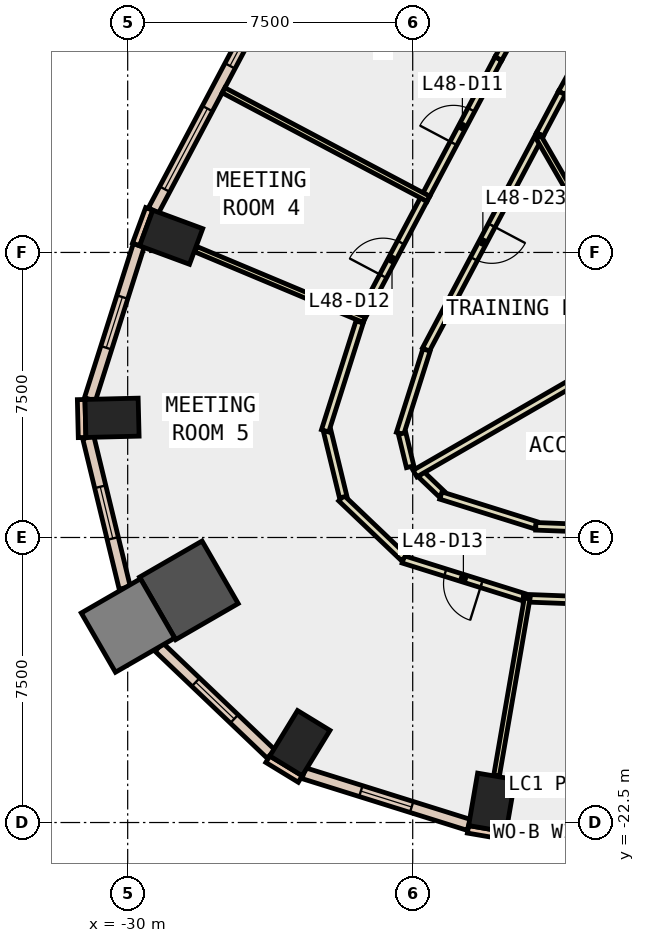
"""IFC4 building model, lengths in metres.
Left out: names, types, materials, properties, quantities, classifications, styles, units other than length and angle.
Written with IfcOpenShell. Run it as: python <this file> out.ifc"""

import sys

from ifc_helpers import new_model, si_unit, direction, frame, frame_2d, origin, origin_2d, place, context, subcontext, project, spatial, rectangle, extrude, element, fill, save


model = new_model("IFC4")
c1 = context("Model", 3, precision=1e-05, world=origin(), true_north=direction((0.0, 1.0)))
c2 = subcontext(c1, "Body", "Model", "MODEL_VIEW")
j1 = project(units=[si_unit("LENGTHUNIT", "METRE"), si_unit("PLANEANGLEUNIT", "RADIAN")], contexts=[c1])
p1 = place(None, origin())
s1 = spatial("IfcSite", under=j1, at=p1, CompositionType="ELEMENT")
p2 = place(p1, origin())
s2 = spatial("IfcBuilding", under=s1, at=p2, CompositionType="ELEMENT")
p3 = place(p2, frame((0.0, 0.0, 215.0)))
s3 = spatial("IfcBuildingStorey", under=s2, at=p3, CompositionType="ELEMENT", Elevation=215.0)
for number, where, z_axis, x_axis in (
    (1, (-20.417, -21.975, -0.4), (0.0, 0.0, 1.0), (-0.986, 0.169, 0.0)),
    (2, (-28.856, -7.1, -0.4), (0.0, 0.0, 1.0), (0.347, 0.938, 0.0)),
    (3, (-30.412, -11.851, -0.4), (0.0, 0.0, 1.0), (-0.025, 1.0, 0.0)),
):
    element("IfcColumn", number, at=place(p3, frame(where, z_axis=z_axis, x_axis=x_axis)), inside=s3, PredefinedType="COLUMN", context=c2, shape_type="SweptSolid", body=[
        extrude(rectangle(XDim=1.0, YDim=1.4, at=origin_2d()), origin(), (0.0, 0.0, 1.0), 4.2),
    ])
p4 = place(p3, frame((-28.39, -16.391, -0.4), z_axis=(0.0, 0.0, 1.0), x_axis=(0.866025403784, 0.5, 0.0)))
e4 = element("IfcColumn", 4, at=p4, inside=s3, PredefinedType="COLUMN", context=c2, shape_type="SweptSolid", body=[
    extrude(rectangle(XDim=1.9, YDim=1.9, at=origin_2d()), origin(), (0.0, 0.0, 1.0), 4.2),
])
p5 = place(p3, frame((-25.469, -20.412, -0.4), z_axis=(0.0, 0.0, 1.0), x_axis=(-0.853423465127, 0.521218178089, 0.0)))
e5 = element("IfcColumn", 5, at=p5, inside=s3, PredefinedType="COLUMN", context=c2, shape_type="SweptSolid", body=[
    extrude(rectangle(XDim=1.0, YDim=1.4, at=origin_2d()), origin(), (0.0, 0.0, 1.0), 4.2),
])
p6 = place(p3, frame((-29.992, -17.316, -0.4), z_axis=(0.0, 0.0, 1.0), x_axis=(0.866025403784, 0.5, 0.0)))
e6 = element("IfcColumn", 6, at=p6, inside=s3, PredefinedType="COLUMN", context=c2, shape_type="SweptSolid", body=[
    extrude(rectangle(XDim=1.8, YDim=1.8, at=origin_2d()), origin(), (0.0, 0.0, 1.0), 4.2),
])
p7 = place(p3, frame((-29.433, -6.354, 0.0), z_axis=(0.0, 0.0, 1.0), x_axis=(-0.346892928577, -0.937904737222, 0.0)))
e7 = element("IfcWall", 7, at=p7, inside=s3, PredefinedType="STANDARD", context=c2, shape_type="SweptSolid", body=[
    extrude(rectangle(XDim=1.0, YDim=0.2, at=frame_2d((0.5, 0.0))), origin(), (0.0, 0.0, 1.0), 3.8),
])
p8 = place(p3, frame((-21.045, -22.679, 0.0), z_axis=(0.0, 0.0, 1.0), x_axis=(0.985631544579, -0.168909615862, 0.0)))
e8 = element("IfcWall", 8, at=p8, inside=s3, PredefinedType="STANDARD", context=c2, shape_type="SweptSolid", body=[
    extrude(rectangle(XDim=1.0, YDim=0.2, at=frame_2d((0.5, 0.0))), origin(), (0.0, 0.0, 1.0), 3.8),
])
p9 = place(p3, frame((-31.224, -11.371, 0.0), z_axis=(0.0, 0.0, 1.0), x_axis=(0.024186470916, -0.999707464524, 0.0)))
e9 = element("IfcWall", 9, at=p9, inside=s3, PredefinedType="STANDARD", context=c2, shape_type="SweptSolid", body=[
    extrude(rectangle(XDim=0.999, YDim=0.2, at=frame_2d((0.5, 0.0))), origin(), (0.0, 0.0, 1.0), 3.8),
])
p10 = place(p3, frame((-26.313, -20.834, 0.0), z_axis=(0.0, 0.0, 1.0), x_axis=(0.853679739553, -0.520798331677, 0.0)))
e10 = element("IfcWall", 10, at=p10, inside=s3, PredefinedType="STANDARD", context=c2, shape_type="SweptSolid", body=[
    extrude(rectangle(XDim=1.0, YDim=0.2, at=frame_2d((0.5, 0.0))), origin(), (0.0, 0.0, 1.0), 3.8),
])
p11 = place(p3, frame((-20.04, -22.732, 0.0), z_axis=(0.0, 0.0, 1.0), x_axis=(0.99926218254, -0.038406907512, 0.0)))
e11 = element("IfcWall", 11, at=p11, inside=s3, PredefinedType="STANDARD", context=c2, shape_type="SweptSolid", body=[
    extrude(rectangle(XDim=5.365, YDim=0.3, at=frame_2d((2.683, 0.0))), origin(), (0.0, 0.0, 1.0), 3.8),
])
p12 = place(p11, frame((0.641, 0.0, 0.9)))
e12 = element("IfcOpeningElement", 12, at=p12, cuts=e11, PredefinedType="OPENING", context=c2, shape_type="SweptSolid", body=[
    extrude(rectangle(XDim=1.4, YDim=2.6, at=frame_2d((0.7, 1.3))), frame((0.0, 0.16, 0.0), z_axis=(0.0, -1.0, 0.0), x_axis=(1.0, 0.0, 0.0)), (0.0, 0.0, 1.0), 0.32),
])
p13 = place(p11, frame((3.324, 0.0, 0.9)))
e13 = element("IfcOpeningElement", 13, at=p13, cuts=e11, PredefinedType="OPENING", context=c2, shape_type="SweptSolid", body=[
    extrude(rectangle(XDim=1.4, YDim=2.6, at=frame_2d((0.7, 1.3))), frame((0.0, 0.16, 0.0), z_axis=(0.0, -1.0, 0.0), x_axis=(1.0, 0.0, 0.0)), (0.0, 0.0, 1.0), 0.32),
])
p14 = place(p3, frame((-25.887, 0.09, 0.0), z_axis=(0.0, 0.0, 1.0), x_axis=(-0.468020680141, -0.8837175131, 0.0)))
e14 = element("IfcWall", 14, at=p14, inside=s3, PredefinedType="STANDARD", context=c2, shape_type="SweptSolid", body=[
    extrude(rectangle(XDim=7.34, YDim=0.3, at=frame_2d((3.67, 0.0))), origin(), (0.0, 0.0, 1.0), 3.8),
])
p15 = place(p14, frame((0.635, 0.0, 0.9)))
e15 = element("IfcOpeningElement", 15, at=p15, cuts=e14, PredefinedType="OPENING", context=c2, shape_type="SweptSolid", body=[
    extrude(rectangle(XDim=2.4, YDim=2.6, at=frame_2d((1.2, 1.3))), frame((0.0, 0.16, 0.0), z_axis=(0.0, -1.0, 0.0), x_axis=(1.0, 0.0, 0.0)), (0.0, 0.0, 1.0), 0.32),
])
p16 = place(p14, frame((4.305, 0.0, 0.9)))
e16 = element("IfcOpeningElement", 16, at=p16, cuts=e14, PredefinedType="OPENING", context=c2, shape_type="SweptSolid", body=[
    extrude(rectangle(XDim=2.4, YDim=2.6, at=frame_2d((1.2, 1.3))), frame((0.0, 0.16, 0.0), z_axis=(0.0, -1.0, 0.0), x_axis=(1.0, 0.0, 0.0)), (0.0, 0.0, 1.0), 0.32),
])
p17 = place(p3, frame((-29.71, -7.316, 0.0), z_axis=(0.0, 0.0, 1.0), x_axis=(-0.302195467572, -0.953245980521, 0.0)))
e17 = element("IfcWall", 17, at=p17, inside=s3, PredefinedType="STANDARD", context=c2, shape_type="SweptSolid", body=[
    extrude(rectangle(XDim=4.249, YDim=0.3, at=frame_2d((2.125, 0.0))), origin(), (0.0, 0.0, 1.0), 3.8),
])
p18 = place(p17, frame((1.424, 0.0, 0.9)))
e18 = element("IfcOpeningElement", 18, at=p18, cuts=e17, PredefinedType="OPENING", context=c2, shape_type="SweptSolid", body=[
    extrude(rectangle(XDim=1.4, YDim=2.6, at=frame_2d((0.7, 1.3))), frame((0.0, 0.16, 0.0), z_axis=(0.0, -1.0, 0.0), x_axis=(1.0, 0.0, 0.0)), (0.0, 0.0, 1.0), 0.32),
])
p19 = place(p3, frame((-31.038, -12.365, 0.0), z_axis=(0.0, 0.0, 1.0), x_axis=(0.235766276378, -0.971809787419, 0.0)))
e19 = element("IfcWall", 19, at=p19, inside=s3, PredefinedType="STANDARD", context=c2, shape_type="SweptSolid", body=[
    extrude(rectangle(XDim=4.077, YDim=0.3, at=frame_2d((2.039, 0.0))), origin(), (0.0, 0.0, 1.0), 3.8),
])
p20 = place(p19, frame((1.338, 0.0, 0.9)))
e20 = element("IfcOpeningElement", 20, at=p20, cuts=e19, PredefinedType="OPENING", context=c2, shape_type="SweptSolid", body=[
    extrude(rectangle(XDim=1.4, YDim=2.6, at=frame_2d((0.7, 1.3))), frame((0.0, 0.16, 0.0), z_axis=(0.0, -1.0, 0.0), x_axis=(1.0, 0.0, 0.0)), (0.0, 0.0, 1.0), 0.32),
])
p21 = place(p3, frame((-29.178, -17.884, 0.0), z_axis=(0.0, 0.0, 1.0), x_axis=(0.723707630873, -0.69010670553, 0.0)))
e21 = element("IfcWall", 21, at=p21, inside=s3, PredefinedType="STANDARD", context=c2, shape_type="SweptSolid", body=[
    extrude(rectangle(XDim=4.076, YDim=0.3, at=frame_2d((2.038, 0.0))), origin(), (0.0, 0.0, 1.0), 3.8),
])
p22 = place(p21, frame((1.338, 0.0, 0.9)))
e22 = element("IfcOpeningElement", 22, at=p22, cuts=e21, PredefinedType="OPENING", context=c2, shape_type="SweptSolid", body=[
    extrude(rectangle(XDim=1.4, YDim=2.6, at=frame_2d((0.7, 1.3))), frame((0.0, 0.16, 0.0), z_axis=(0.0, -1.0, 0.0), x_axis=(1.0, 0.0, 0.0)), (0.0, 0.0, 1.0), 0.32),
])
p23 = place(p3, frame((-25.367, -21.202, 0.0), z_axis=(0.0, 0.0, 1.0), x_axis=(0.954297481837, -0.298858354675, 0.0)))
e23 = element("IfcWall", 23, at=p23, inside=s3, PredefinedType="STANDARD", context=c2, shape_type="SweptSolid", body=[
    extrude(rectangle(XDim=4.551, YDim=0.3, at=frame_2d((2.275, 0.0))), origin(), (0.0, 0.0, 1.0), 3.8),
])
p24 = place(p23, frame((1.575, 0.0, 0.9)))
e24 = element("IfcOpeningElement", 24, at=p24, cuts=e23, PredefinedType="OPENING", context=c2, shape_type="SweptSolid", body=[
    extrude(rectangle(XDim=1.4, YDim=2.6, at=frame_2d((0.7, 1.3))), frame((0.0, 0.16, 0.0), z_axis=(0.0, -1.0, 0.0), x_axis=(1.0, 0.0, 0.0)), (0.0, 0.0, 1.0), 0.32),
])
p25 = place(p3, frame((-14.652, 3.783, 0.0), z_axis=(0.0, 0.0, 1.0), x_axis=(-0.484249955458, -0.874929700398, 0.0)))
e25 = element("IfcWall", 25, at=p25, inside=s3, PredefinedType="PARTITIONING", context=c2, shape_type="SweptSolid", body=[
    extrude(rectangle(XDim=8.099, YDim=0.2, at=frame_2d((4.049, 0.0))), origin(), (0.0, 0.0, 1.0), 3.8),
])
p26 = place(p25, frame((3.55, 0.0, 0.0)))
e26 = element("IfcOpeningElement", 26, at=p26, cuts=e25, PredefinedType="OPENING", context=c2, shape_type="SweptSolid", body=[
    extrude(rectangle(XDim=1.0, YDim=2.1, at=frame_2d((0.5, 1.05))), frame((0.0, 0.11, 0.0), z_axis=(0.0, -1.0, 0.0), x_axis=(1.0, 0.0, 0.0)), (0.0, 0.0, 1.0), 0.22),
])
p27 = place(p3, frame((-18.574, -3.303, 0.0), z_axis=(0.0, 0.0, 1.0), x_axis=(-0.468458328651, -0.883485593724, 0.0)))
e27 = element("IfcWall", 27, at=p27, inside=s3, PredefinedType="PARTITIONING", context=c2, shape_type="SweptSolid", body=[
    extrude(rectangle(XDim=1.238, YDim=0.2, at=frame_2d((0.619, 0.0))), origin(), (0.0, 0.0, 1.0), 3.8),
])
p28 = place(p3, frame((-19.154, -4.397, 0.0), z_axis=(0.0, 0.0, 1.0), x_axis=(-0.468118749105, -0.883665568378, 0.0)))
e28 = element("IfcWall", 28, at=p28, inside=s3, PredefinedType="PARTITIONING", context=c2, shape_type="SweptSolid", body=[
    extrude(rectangle(XDim=6.409, YDim=0.2, at=frame_2d((3.204, 0.0))), origin(), (0.0, 0.0, 1.0), 3.8),
])
p29 = place(p28, frame((2.704, 0.0, 0.0)))
e29 = element("IfcOpeningElement", 29, at=p29, cuts=e28, PredefinedType="OPENING", context=c2, shape_type="SweptSolid", body=[
    extrude(rectangle(XDim=1.0, YDim=2.1, at=frame_2d((0.5, 1.05))), frame((0.0, 0.11, 0.0), z_axis=(0.0, -1.0, 0.0), x_axis=(1.0, 0.0, 0.0)), (0.0, 0.0, 1.0), 0.22),
])
p30 = place(p3, frame((-22.137, -10.067, 0.0), z_axis=(0.0, 0.0, 1.0), x_axis=(-0.302262657712, -0.953224677478, 0.0)))
e30 = element("IfcWall", 30, at=p30, inside=s3, PredefinedType="PARTITIONING", context=c2, shape_type="SweptSolid", body=[
    extrude(rectangle(XDim=2.303, YDim=0.2, at=frame_2d((1.151, 0.0))), origin(), (0.0, 0.0, 1.0), 3.8),
])
p31 = place(p3, frame((-22.779, -12.264, 0.0), z_axis=(0.0, 0.0, 1.0), x_axis=(0.2356388299, -0.971840697771, 0.0)))
e31 = element("IfcWall", 31, at=p31, inside=s3, PredefinedType="PARTITIONING", context=c2, shape_type="SweptSolid", body=[
    extrude(rectangle(XDim=0.9, YDim=0.2, at=frame_2d((0.45, 0.0))), origin(), (0.0, 0.0, 1.0), 3.8),
])
p32 = place(p3, frame((-22.281, -13.337, 0.0), z_axis=(0.0, 0.0, 1.0), x_axis=(0.723443840005, -0.690383234413, 0.0)))
e32 = element("IfcWall", 32, at=p32, inside=s3, PredefinedType="PARTITIONING", context=c2, shape_type="SweptSolid", body=[
    extrude(rectangle(XDim=0.753, YDim=0.2, at=frame_2d((0.376, 0.0))), origin(), (0.0, 0.0, 1.0), 3.8),
])
p33 = place(p3, frame((-21.759, -13.896, 0.0), z_axis=(0.0, 0.0, 1.0), x_axis=(0.954254371194, -0.298995978328, 0.0)))
e33 = element("IfcWall", 33, at=p33, inside=s3, PredefinedType="PARTITIONING", context=c2, shape_type="SweptSolid", body=[
    extrude(rectangle(XDim=2.622, YDim=0.2, at=frame_2d((1.311, 0.0))), origin(), (0.0, 0.0, 1.0), 3.8),
])
p34 = place(p3, frame((-19.261, -14.706, 0.0), z_axis=(0.0, 0.0, 1.0), x_axis=(0.999262930749, -0.038387435847, 0.0)))
e34 = element("IfcWall", 34, at=p34, inside=s3, PredefinedType="PARTITIONING", context=c2, shape_type="SweptSolid", body=[
    extrude(rectangle(XDim=5.336, YDim=0.2, at=frame_2d((2.668, 0.0))), origin(), (0.0, 0.0, 1.0), 3.8),
])
p35 = place(p34, frame((2.168, 0.0, 0.0)))
e35 = element("IfcOpeningElement", 35, at=p35, cuts=e34, PredefinedType="OPENING", context=c2, shape_type="SweptSolid", body=[
    extrude(rectangle(XDim=1.0, YDim=2.1, at=frame_2d((0.5, 1.05))), frame((0.0, 0.11, 0.0), z_axis=(0.0, -1.0, 0.0), x_axis=(1.0, 0.0, 0.0)), (0.0, 0.0, 1.0), 0.22),
])
p36 = place(p3, frame((-22.14, -5.976, 0.0), z_axis=(0.0, 0.0, 1.0), x_axis=(0.467979143965, 0.883739509592, 0.0)))
e36 = element("IfcWall", 36, at=p36, inside=s3, PredefinedType="PARTITIONING", context=c2, shape_type="SweptSolid", body=[
    extrude(rectangle(XDim=4.049, YDim=0.2, at=frame_2d((2.024, 0.0))), origin(), (0.0, 0.0, 1.0), 3.8),
])
p37 = place(p36, frame((1.524, 0.0, 0.0)))
e37 = element("IfcOpeningElement", 37, at=p37, cuts=e36, PredefinedType="OPENING", context=c2, shape_type="SweptSolid", body=[
    extrude(rectangle(XDim=1.0, YDim=2.1, at=frame_2d((0.5, 1.05))), frame((0.0, 0.11, 0.0), z_axis=(0.0, -1.0, 0.0), x_axis=(1.0, 0.0, 0.0)), (0.0, 0.0, 1.0), 0.22),
])
p38 = place(p3, frame((-20.245, -2.398, 0.0), z_axis=(0.0, 0.0, 1.0), x_axis=(0.484328424129, 0.874886265511, 0.0)))
e38 = element("IfcWall", 38, at=p38, inside=s3, PredefinedType="PARTITIONING", context=c2, shape_type="SweptSolid", body=[
    extrude(rectangle(XDim=3.991, YDim=0.2, at=frame_2d((1.996, 0.0))), origin(), (0.0, 0.0, 1.0), 3.8),
])
p39 = place(p3, frame((-23.878, -9.256, 0.0), z_axis=(0.0, 0.0, 1.0), x_axis=(0.46795384568, 0.883752905689, 0.0)))
e39 = element("IfcWall", 39, at=p39, inside=s3, PredefinedType="PARTITIONING", context=c2, shape_type="SweptSolid", body=[
    extrude(rectangle(XDim=3.562, YDim=0.2, at=frame_2d((1.781, 0.0))), origin(), (0.0, 0.0, 1.0), 3.8),
])
p40 = place(p39, frame((1.281, 0.0, 0.0)))
e40 = element("IfcOpeningElement", 40, at=p40, cuts=e39, PredefinedType="OPENING", context=c2, shape_type="SweptSolid", body=[
    extrude(rectangle(XDim=1.0, YDim=2.1, at=frame_2d((0.5, 1.05))), frame((0.0, 0.11, 0.0), z_axis=(0.0, -1.0, 0.0), x_axis=(1.0, 0.0, 0.0)), (0.0, 0.0, 1.0), 0.22),
])
p41 = place(p3, frame((-19.583, -16.569, 0.0), z_axis=(0.0, 0.0, 1.0), x_axis=(-0.954238750745, 0.299045826884, 0.0)))
e41 = element("IfcWall", 41, at=p41, inside=s3, PredefinedType="PARTITIONING", context=c2, shape_type="SweptSolid", body=[
    extrude(rectangle(XDim=3.318, YDim=0.2, at=frame_2d((1.659, 0.0))), origin(), (0.0, 0.0, 1.0), 3.8),
])
p42 = place(p41, frame((1.159, 0.0, 0.0)))
e42 = element("IfcOpeningElement", 42, at=p42, cuts=e41, PredefinedType="OPENING", context=c2, shape_type="SweptSolid", body=[
    extrude(rectangle(XDim=1.0, YDim=2.1, at=frame_2d((0.5, 1.05))), frame((0.0, 0.11, 0.0), z_axis=(0.0, -1.0, 0.0), x_axis=(1.0, 0.0, 0.0)), (0.0, 0.0, 1.0), 0.22),
])
p43 = place(p3, frame((-22.726, -15.538, 0.0), z_axis=(0.0, 0.0, 1.0), x_axis=(-0.723967420116, 0.689834164571, 0.0)))
e43 = element("IfcWall", 43, at=p43, inside=s3, PredefinedType="PARTITIONING", context=c2, shape_type="SweptSolid", body=[
    extrude(rectangle(XDim=2.282, YDim=0.2, at=frame_2d((1.141, 0.0))), origin(), (0.0, 0.0, 1.0), 3.8),
])
p44 = place(p3, frame((-24.329, -13.935, 0.0), z_axis=(0.0, 0.0, 1.0), x_axis=(-0.235756216468, 0.971812227952, 0.0)))
e44 = element("IfcWall", 44, at=p44, inside=s3, PredefinedType="PARTITIONING", context=c2, shape_type="SweptSolid", body=[
    extrude(rectangle(XDim=1.79, YDim=0.2, at=frame_2d((0.895, 0.0))), origin(), (0.0, 0.0, 1.0), 3.8),
])
p45 = place(p3, frame((-24.805, -12.194, 0.0), z_axis=(0.0, 0.0, 1.0), x_axis=(0.302200639646, 0.953244340868, 0.0)))
e45 = element("IfcWall", 45, at=p45, inside=s3, PredefinedType="PARTITIONING", context=c2, shape_type="SweptSolid", body=[
    extrude(rectangle(XDim=3.004, YDim=0.2, at=frame_2d((1.502, 0.0))), origin(), (0.0, 0.0, 1.0), 3.8),
])
p46 = place(p3, frame((-13.988, -16.81, 0.0), z_axis=(0.0, 0.0, 1.0), x_axis=(-0.999263168163, 0.038381255227, 0.0)))
e46 = element("IfcWall", 46, at=p46, inside=s3, PredefinedType="PARTITIONING", context=c2, shape_type="SweptSolid", body=[
    extrude(rectangle(XDim=5.604, YDim=0.2, at=frame_2d((2.802, 0.0))), origin(), (0.0, 0.0, 1.0), 3.8),
])
p47 = place(p46, frame((2.302, 0.0, 0.0)))
e47 = element("IfcOpeningElement", 47, at=p47, cuts=e46, PredefinedType="OPENING", context=c2, shape_type="SweptSolid", body=[
    extrude(rectangle(XDim=1.0, YDim=2.1, at=frame_2d((0.5, 1.05))), frame((0.0, 0.11, 0.0), z_axis=(0.0, -1.0, 0.0), x_axis=(1.0, 0.0, 0.0)), (0.0, 0.0, 1.0), 0.22),
])
p48 = place(p3, frame((-16.525, -9.079, 0.0), z_axis=(0.0, 0.0, 1.0), x_axis=(-0.499943228252, 0.866058178487, 0.0)))
e48 = element("IfcWall", 48, at=p48, inside=s3, PredefinedType="PARTITIONING", context=c2, shape_type="SweptSolid", body=[
    extrude(rectangle(XDim=5.329, YDim=0.15, at=frame_2d((2.664, 0.0))), origin(), (0.0, 0.0, 1.0), 3.8),
])
p49 = place(p3, frame((-16.514, -9.897, 0.0), z_axis=(0.0, 0.0, 1.0), x_axis=(-0.866041209536, -0.499972622635, 0.0)))
e49 = element("IfcWall", 49, at=p49, inside=s3, PredefinedType="PARTITIONING", context=c2, shape_type="SweptSolid", body=[
    extrude(rectangle(XDim=6.843, YDim=0.2, at=frame_2d((3.421, 0.0))), origin(), (0.0, 0.0, 1.0), 3.8),
])
p50 = place(p3, frame((-22.087, -6.089, 0.0), z_axis=(0.0, 0.0, 1.0), x_axis=(-0.883611647524, 0.468220521079, 0.0)))
e50 = element("IfcWall", 50, at=p50, inside=s3, PredefinedType="PARTITIONING", context=c2, shape_type="SweptSolid", body=[
    extrude(rectangle(XDim=6.1, YDim=0.15, at=frame_2d((3.05, 0.0))), origin(), (0.0, 0.0, 1.0), 3.8),
])
p51 = place(p3, frame((-23.774, -9.273, 0.0), z_axis=(0.0, 0.0, 1.0), x_axis=(-0.922217762148, 0.386670918454, 0.0)))
e51 = element("IfcWall", 51, at=p51, inside=s3, PredefinedType="PARTITIONING", context=c2, shape_type="SweptSolid", body=[
    extrude(rectangle(XDim=4.805, YDim=0.15, at=frame_2d((2.402, 0.0))), origin(), (0.0, 0.0, 1.0), 3.8),
])
p52 = place(p3, frame((-19.488, -16.599, 0.0), z_axis=(0.0, 0.0, 1.0), x_axis=(-0.169963884325, -0.985450292011, 0.0)))
e52 = element("IfcWall", 52, at=p52, inside=s3, PredefinedType="PARTITIONING", context=c2, shape_type="SweptSolid", body=[
    extrude(rectangle(XDim=4.736, YDim=0.15, at=frame_2d((2.368, 0.0))), origin(), (0.0, 0.0, 1.0), 3.8),
])
p53 = place(p12, origin())
e53 = element("IfcWindow", 53, at=p53, inside=s3, PartitioningType="SINGLE_PANEL", PredefinedType="WINDOW", context=c2, shape_type="SweptSolid", body=[
    extrude(rectangle(XDim=1.4, YDim=2.6, at=frame_2d((0.7, 1.3))), frame((0.0, 0.03, 0.0), z_axis=(0.0, -1.0, 0.0), x_axis=(1.0, 0.0, 0.0)), (0.0, 0.0, 1.0), 0.06),
])
fill(e12, e53)
p54 = place(p15, origin())
e54 = element("IfcWindow", 54, at=p54, inside=s3, PartitioningType="SINGLE_PANEL", PredefinedType="WINDOW", context=c2, shape_type="SweptSolid", body=[
    extrude(rectangle(XDim=2.4, YDim=2.6, at=frame_2d((1.2, 1.3))), frame((0.0, 0.03, 0.0), z_axis=(0.0, -1.0, 0.0), x_axis=(1.0, 0.0, 0.0)), (0.0, 0.0, 1.0), 0.06),
])
fill(e15, e54)
p55 = place(p16, origin())
e55 = element("IfcWindow", 55, at=p55, inside=s3, PartitioningType="SINGLE_PANEL", PredefinedType="WINDOW", context=c2, shape_type="SweptSolid", body=[
    extrude(rectangle(XDim=2.4, YDim=2.6, at=frame_2d((1.2, 1.3))), frame((0.0, 0.03, 0.0), z_axis=(0.0, -1.0, 0.0), x_axis=(1.0, 0.0, 0.0)), (0.0, 0.0, 1.0), 0.06),
])
fill(e16, e55)
p56 = place(p18, origin())
e56 = element("IfcWindow", 56, at=p56, inside=s3, PartitioningType="SINGLE_PANEL", PredefinedType="WINDOW", context=c2, shape_type="SweptSolid", body=[
    extrude(rectangle(XDim=1.4, YDim=2.6, at=frame_2d((0.7, 1.3))), frame((0.0, 0.03, 0.0), z_axis=(0.0, -1.0, 0.0), x_axis=(1.0, 0.0, 0.0)), (0.0, 0.0, 1.0), 0.06),
])
fill(e18, e56)
p57 = place(p20, origin())
e57 = element("IfcWindow", 57, at=p57, inside=s3, PartitioningType="SINGLE_PANEL", PredefinedType="WINDOW", context=c2, shape_type="SweptSolid", body=[
    extrude(rectangle(XDim=1.4, YDim=2.6, at=frame_2d((0.7, 1.3))), frame((0.0, 0.03, 0.0), z_axis=(0.0, -1.0, 0.0), x_axis=(1.0, 0.0, 0.0)), (0.0, 0.0, 1.0), 0.06),
])
fill(e20, e57)
p58 = place(p22, origin())
e58 = element("IfcWindow", 58, at=p58, inside=s3, PartitioningType="SINGLE_PANEL", PredefinedType="WINDOW", context=c2, shape_type="SweptSolid", body=[
    extrude(rectangle(XDim=1.4, YDim=2.6, at=frame_2d((0.7, 1.3))), frame((0.0, 0.03, 0.0), z_axis=(0.0, -1.0, 0.0), x_axis=(1.0, 0.0, 0.0)), (0.0, 0.0, 1.0), 0.06),
])
fill(e22, e58)
p59 = place(p24, origin())
e59 = element("IfcWindow", 59, at=p59, inside=s3, PartitioningType="SINGLE_PANEL", PredefinedType="WINDOW", context=c2, shape_type="SweptSolid", body=[
    extrude(rectangle(XDim=1.4, YDim=2.6, at=frame_2d((0.7, 1.3))), frame((0.0, 0.03, 0.0), z_axis=(0.0, -1.0, 0.0), x_axis=(1.0, 0.0, 0.0)), (0.0, 0.0, 1.0), 0.06),
])
fill(e24, e59)
p60 = place(p37, origin())
e60 = element("IfcDoor", 60, at=p60, inside=s3, OperationType="SINGLE_SWING_LEFT", PredefinedType="DOOR", context=c2, shape_type="SweptSolid", body=[
    extrude(rectangle(XDim=1.0, YDim=2.1, at=frame_2d((0.5, 1.05))), frame((0.0, 0.025, 0.0), z_axis=(0.0, -1.0, 0.0), x_axis=(1.0, 0.0, 0.0)), (0.0, 0.0, 1.0), 0.05),
])
fill(e37, e60)
p61 = place(p40, origin())
e61 = element("IfcDoor", 61, at=p61, inside=s3, OperationType="SINGLE_SWING_LEFT", PredefinedType="DOOR", context=c2, shape_type="SweptSolid", body=[
    extrude(rectangle(XDim=1.0, YDim=2.1, at=frame_2d((0.5, 1.05))), frame((0.0, 0.025, 0.0), z_axis=(0.0, -1.0, 0.0), x_axis=(1.0, 0.0, 0.0)), (0.0, 0.0, 1.0), 0.05),
])
fill(e40, e61)
p62 = place(p42, origin())
e62 = element("IfcDoor", 62, at=p62, inside=s3, OperationType="SINGLE_SWING_RIGHT", PredefinedType="DOOR", context=c2, shape_type="SweptSolid", body=[
    extrude(rectangle(XDim=1.0, YDim=2.1, at=frame_2d((0.5, 1.05))), frame((0.0, 0.025, 0.0), z_axis=(0.0, -1.0, 0.0), x_axis=(1.0, 0.0, 0.0)), (0.0, 0.0, 1.0), 0.05),
])
fill(e42, e62)
p63 = place(p29, origin())
e63 = element("IfcDoor", 63, at=p63, inside=s3, OperationType="SINGLE_SWING_LEFT", PredefinedType="DOOR", context=c2, shape_type="SweptSolid", body=[
    extrude(rectangle(XDim=1.0, YDim=2.1, at=frame_2d((0.5, 1.05))), frame((0.0, 0.025, 0.0), z_axis=(0.0, -1.0, 0.0), x_axis=(1.0, 0.0, 0.0)), (0.0, 0.0, 1.0), 0.05),
])
fill(e29, e63)
save(model, sys.argv[1])
